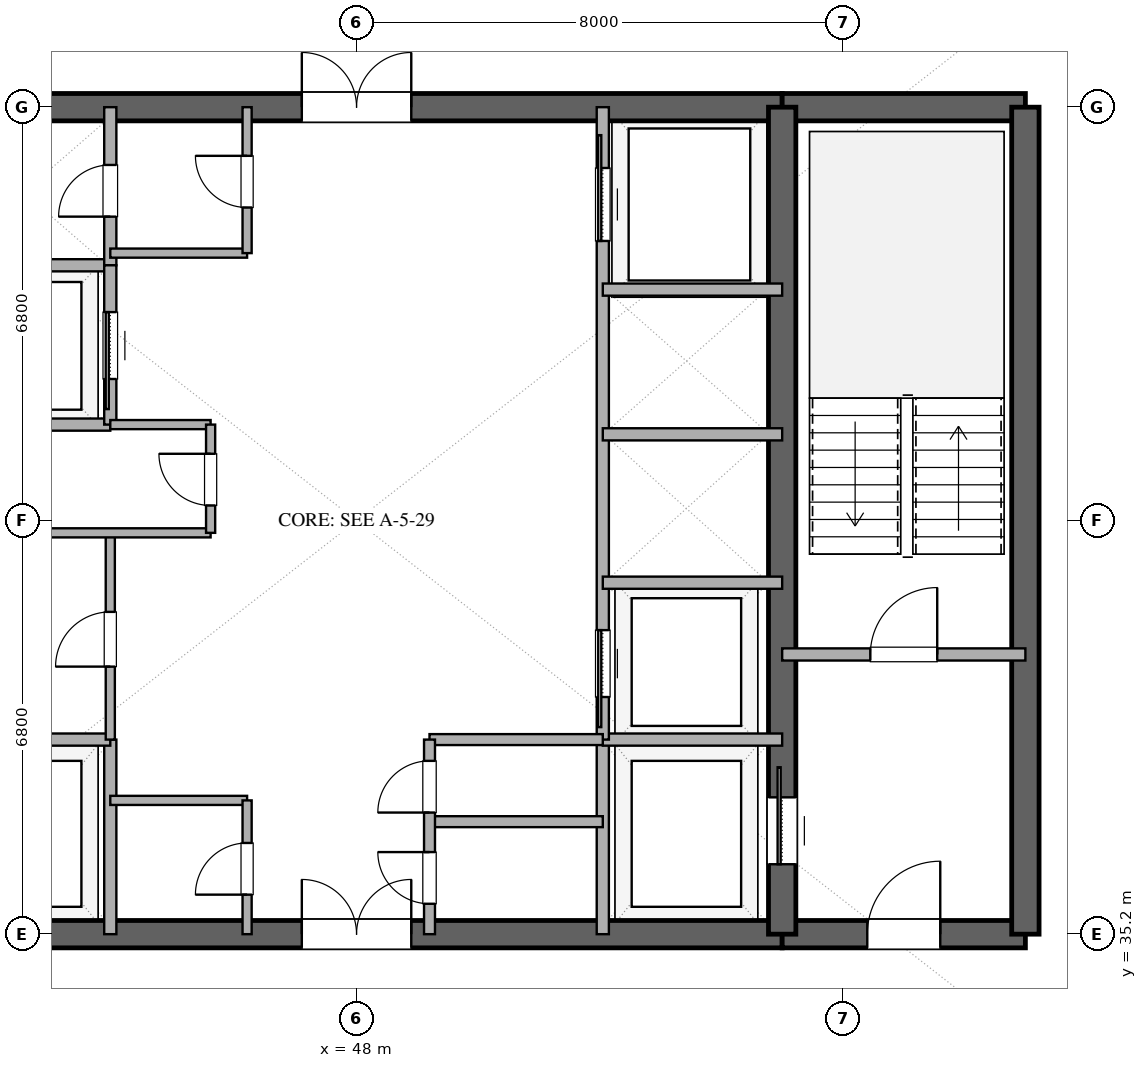
"""IFC4 building model, lengths in metres.
Left out: names, types, materials, properties, quantities, classifications, styles, units other than length and angle.
Written with IfcOpenShell. Run it as: python <this file> out.ifc"""

import sys

from ifc_helpers import new_model, si_unit, direction, frame, frame_2d, origin, place, context, subcontext, project, spatial, rectangle, extrude, element, fill, save


model = new_model("IFC4")
c1 = context("Model", 3, precision=1e-05, world=origin(), true_north=direction((0.0, 1.0)))
c2 = subcontext(c1, "Body", "Model", "MODEL_VIEW")
j1 = project(units=[si_unit("LENGTHUNIT", "METRE"), si_unit("PLANEANGLEUNIT", "RADIAN")], contexts=[c1])
p1 = place(None, origin())
s1 = spatial("IfcSite", under=j1, at=p1, CompositionType="ELEMENT")
p2 = place(p1, origin())
s2 = spatial("IfcBuilding", under=s1, at=p2, CompositionType="ELEMENT")
p3 = place(p2, frame((0.0, 0.0, 197.4)))
s3 = spatial("IfcBuildingStorey", under=s2, at=p3, CompositionType="ELEMENT", Elevation=197.4)
p4 = place(p3, frame((41.0, 35.2, 0.0), z_axis=(0.0, 0.0, 1.0), x_axis=(1.0, 0.0, 0.0)))
e1 = element("IfcWall", 1, at=p4, inside=s3, PredefinedType="SHEAR", context=c2, shape_type="SweptSolid", body=[
    extrude(rectangle(XDim=14.0, YDim=0.45, at=frame_2d((7.0, 0.0))), origin(), (0.0, 0.0, 1.0), 3.25),
])
p5 = place(p4, frame((6.1, 0.0, 0.0)))
e2 = element("IfcOpeningElement", 2, at=p5, cuts=e1, PredefinedType="OPENING", context=c2, shape_type="SweptSolid", body=[
    extrude(rectangle(XDim=1.8, YDim=2.25, at=frame_2d((0.9, 1.125))), frame((0.0, 0.235, 0.0), z_axis=(0.0, -1.0, 0.0), x_axis=(1.0, 0.0, 0.0)), (0.0, 0.0, 1.0), 0.47),
])
p6 = place(p3, frame((55.0, 35.2, 0.0), z_axis=(0.0, 0.0, 1.0), x_axis=(1.0, 0.0, 0.0)))
e3 = element("IfcWall", 3, at=p6, inside=s3, PredefinedType="SHEAR", context=c2, shape_type="SweptSolid", body=[
    extrude(rectangle(XDim=4.0, YDim=0.45, at=frame_2d((2.0, 0.0))), origin(), (0.0, 0.0, 1.0), 3.25),
])
p7 = place(p6, frame((1.4, 0.0, 0.0)))
e4 = element("IfcOpeningElement", 4, at=p7, cuts=e3, PredefinedType="OPENING", context=c2, shape_type="SweptSolid", body=[
    extrude(rectangle(XDim=1.2, YDim=2.15, at=frame_2d((0.6, 1.075))), frame((0.0, 0.235, 0.0), z_axis=(0.0, -1.0, 0.0), x_axis=(1.0, 0.0, 0.0)), (0.0, 0.0, 1.0), 0.47),
])
p8 = place(p3, frame((41.0, 48.8, 0.0), z_axis=(0.0, 0.0, 1.0), x_axis=(1.0, 0.0, 0.0)))
e5 = element("IfcWall", 5, at=p8, inside=s3, PredefinedType="SHEAR", context=c2, shape_type="SweptSolid", body=[
    extrude(rectangle(XDim=14.0, YDim=0.45, at=frame_2d((7.0, 0.0))), origin(), (0.0, 0.0, 1.0), 3.25),
])
p9 = place(p8, frame((6.1, 0.0, 0.0)))
e6 = element("IfcOpeningElement", 6, at=p9, cuts=e5, PredefinedType="OPENING", context=c2, shape_type="SweptSolid", body=[
    extrude(rectangle(XDim=1.8, YDim=2.25, at=frame_2d((0.9, 1.125))), frame((0.0, 0.235, 0.0), z_axis=(0.0, -1.0, 0.0), x_axis=(1.0, 0.0, 0.0)), (0.0, 0.0, 1.0), 0.47),
])
p10 = place(p3, frame((55.0, 48.8, 0.0), z_axis=(0.0, 0.0, 1.0), x_axis=(1.0, 0.0, 0.0)))
e7 = element("IfcWall", 7, at=p10, inside=s3, PredefinedType="SHEAR", context=c2, shape_type="SweptSolid", body=[
    extrude(rectangle(XDim=4.0, YDim=0.45, at=frame_2d((2.0, 0.0))), origin(), (0.0, 0.0, 1.0), 3.25),
])
p11 = place(p3, frame((59.0, 35.2, 0.0), z_axis=(0.0, 0.0, 1.0), x_axis=(0.0, 1.0, 0.0)))
e8 = element("IfcWall", 8, at=p11, inside=s3, PredefinedType="SHEAR", context=c2, shape_type="SweptSolid", body=[
    extrude(rectangle(XDim=13.6, YDim=0.45, at=frame_2d((6.8, 0.0))), origin(), (0.0, 0.0, 1.0), 3.25),
])
p12 = place(p3, frame((55.0, 35.2, 0.0), z_axis=(0.0, 0.0, 1.0), x_axis=(0.0, 1.0, 0.0)))
e9 = element("IfcWall", 9, at=p12, inside=s3, PredefinedType="SHEAR", context=c2, shape_type="SweptSolid", body=[
    extrude(rectangle(XDim=13.6, YDim=0.45, at=frame_2d((6.8, 0.0))), origin(), (0.0, 0.0, 1.0), 3.25),
])
p13 = place(p12, frame((1.15, 0.0, 0.0)))
e10 = element("IfcOpeningElement", 10, at=p13, cuts=e9, PredefinedType="OPENING", context=c2, shape_type="SweptSolid", body=[
    extrude(rectangle(XDim=1.1, YDim=2.2, at=frame_2d((0.55, 1.1))), frame((0.0, 0.235, 0.0), z_axis=(0.0, -1.0, 0.0), x_axis=(1.0, 0.0, 0.0)), (0.0, 0.0, 1.0), 0.47),
])
p14 = place(p3, frame((55.0, 39.8, 0.0), z_axis=(0.0, 0.0, 1.0), x_axis=(1.0, 0.0, 0.0)))
e11 = element("IfcWall", 11, at=p14, inside=s3, PredefinedType="SOLIDWALL", context=c2, shape_type="SweptSolid", body=[
    extrude(rectangle(XDim=4.0, YDim=0.2, at=frame_2d((2.0, 0.0))), origin(), (0.0, 0.0, 1.0), 2.61),
])
p15 = place(p14, frame((1.45, 0.0, 0.0)))
e12 = element("IfcOpeningElement", 12, at=p15, cuts=e11, PredefinedType="OPENING", context=c2, shape_type="SweptSolid", body=[
    extrude(rectangle(XDim=1.1, YDim=2.15, at=frame_2d((0.55, 1.075))), frame((0.0, 0.11, 0.0), z_axis=(0.0, -1.0, 0.0), x_axis=(1.0, 0.0, 0.0)), (0.0, 0.0, 1.0), 0.22),
])
p16 = place(p3, frame((43.95, 35.2, 0.0), z_axis=(0.0, 0.0, 1.0), x_axis=(0.0, 1.0, 0.0)))
e13 = element("IfcWall", 13, at=p16, inside=s3, PredefinedType="SOLIDWALL", context=c2, shape_type="SweptSolid", body=[
    extrude(rectangle(XDim=3.2, YDim=0.2, at=frame_2d((1.6, 0.0))), origin(), (0.0, 0.0, 1.0), 2.61),
])
p17 = place(p3, frame((41.0, 38.4, 0.0), z_axis=(0.0, 0.0, 1.0), x_axis=(1.0, 0.0, 0.0)))
e14 = element("IfcWall", 14, at=p17, inside=s3, PredefinedType="SOLIDWALL", context=c2, shape_type="SweptSolid", body=[
    extrude(rectangle(XDim=2.95, YDim=0.2, at=frame_2d((1.475, 0.0))), origin(), (0.0, 0.0, 1.0), 2.61),
])
p18 = place(p3, frame((52.05, 35.2, 0.0), z_axis=(0.0, 0.0, 1.0), x_axis=(0.0, 1.0, 0.0)))
e15 = element("IfcWall", 15, at=p18, inside=s3, PredefinedType="SOLIDWALL", context=c2, shape_type="SweptSolid", body=[
    extrude(rectangle(XDim=3.2, YDim=0.2, at=frame_2d((1.6, 0.0))), origin(), (0.0, 0.0, 1.0), 2.61),
])
for number, where, z_axis, x_axis in (
    (16, (52.05, 38.4, 0.0), (0.0, 0.0, 1.0), (1.0, 0.0, 0.0)),
    (17, (41.0, 46.2, 0.0), (0.0, 0.0, 1.0), (1.0, 0.0, 0.0)),
):
    element("IfcWall", number, at=place(p3, frame(where, z_axis=z_axis, x_axis=x_axis)), inside=s3, PredefinedType="SOLIDWALL", context=c2, shape_type="SweptSolid", body=[
        extrude(rectangle(XDim=2.95, YDim=0.2, at=frame_2d((1.475, 0.0))), origin(), (0.0, 0.0, 1.0), 2.61),
    ])
p19 = place(p3, frame((43.95, 46.2, 0.0), z_axis=(0.0, 0.0, 1.0), x_axis=(0.0, 1.0, 0.0)))
e18 = element("IfcWall", 18, at=p19, inside=s3, PredefinedType="SOLIDWALL", context=c2, shape_type="SweptSolid", body=[
    extrude(rectangle(XDim=2.6, YDim=0.2, at=frame_2d((1.3, 0.0))), origin(), (0.0, 0.0, 1.0), 2.61),
])
p20 = place(p19, frame((0.8, 0.0, 0.0)))
e19 = element("IfcOpeningElement", 19, at=p20, cuts=e18, PredefinedType="OPENING", context=c2, shape_type="SweptSolid", body=[
    extrude(rectangle(XDim=0.85, YDim=2.15, at=frame_2d((0.425, 1.075))), frame((0.0, 0.11, 0.0), z_axis=(0.0, -1.0, 0.0), x_axis=(1.0, 0.0, 0.0)), (0.0, 0.0, 1.0), 0.22),
])
p21 = place(p3, frame((41.0, 43.58, 0.0), z_axis=(0.0, 0.0, 1.0), x_axis=(1.0, 0.0, 0.0)))
e20 = element("IfcWall", 20, at=p21, inside=s3, PredefinedType="SOLIDWALL", context=c2, shape_type="SweptSolid", body=[
    extrude(rectangle(XDim=2.95, YDim=0.2, at=frame_2d((1.475, 0.0))), origin(), (0.0, 0.0, 1.0), 2.61),
])
p22 = place(p3, frame((43.95, 43.58, 0.0), z_axis=(0.0, 0.0, 1.0), x_axis=(0.0, 1.0, 0.0)))
e21 = element("IfcWall", 21, at=p22, inside=s3, PredefinedType="SOLIDWALL", context=c2, shape_type="SweptSolid", body=[
    extrude(rectangle(XDim=2.62, YDim=0.2, at=frame_2d((1.31, 0.0))), origin(), (0.0, 0.0, 1.0), 2.61),
])
p23 = place(p22, frame((0.75, 0.0, 0.0)))
e22 = element("IfcOpeningElement", 22, at=p23, cuts=e21, PredefinedType="OPENING", context=c2, shape_type="SweptSolid", body=[
    extrude(rectangle(XDim=1.1, YDim=2.2, at=frame_2d((0.55, 1.1))), frame((0.0, 0.11, 0.0), z_axis=(0.0, -1.0, 0.0), x_axis=(1.0, 0.0, 0.0)), (0.0, 0.0, 1.0), 0.22),
])
p24 = place(p3, frame((43.95, 38.4, 0.0), z_axis=(0.0, 0.0, 1.0), x_axis=(0.0, 1.0, 0.0)))
e23 = element("IfcWall", 23, at=p24, inside=s3, PredefinedType="PARTITIONING", context=c2, shape_type="SweptSolid", body=[
    extrude(rectangle(XDim=3.4, YDim=0.15, at=frame_2d((1.7, 0.0))), origin(), (0.0, 0.0, 1.0), 2.61),
])
p25 = place(p24, frame((1.2, 0.0, 0.0)))
e24 = element("IfcOpeningElement", 24, at=p25, cuts=e23, PredefinedType="OPENING", context=c2, shape_type="SweptSolid", body=[
    extrude(rectangle(XDim=0.9, YDim=2.15, at=frame_2d((0.45, 1.075))), frame((0.0, 0.085, 0.0), z_axis=(0.0, -1.0, 0.0), x_axis=(1.0, 0.0, 0.0)), (0.0, 0.0, 1.0), 0.17),
])
p26 = place(p3, frame((41.0, 41.8, 0.0), z_axis=(0.0, 0.0, 1.0), x_axis=(1.0, 0.0, 0.0)))
e25 = element("IfcWall", 25, at=p26, inside=s3, PredefinedType="PARTITIONING", context=c2, shape_type="SweptSolid", body=[
    extrude(rectangle(XDim=4.6, YDim=0.15, at=frame_2d((2.3, 0.0))), origin(), (0.0, 0.0, 1.0), 2.61),
])
p27 = place(p3, frame((43.95, 43.58, 0.0), z_axis=(0.0, 0.0, 1.0), x_axis=(1.0, 0.0, 0.0)))
e26 = element("IfcWall", 26, at=p27, inside=s3, PredefinedType="PARTITIONING", context=c2, shape_type="SweptSolid", body=[
    extrude(rectangle(XDim=1.65, YDim=0.15, at=frame_2d((0.825, 0.0))), origin(), (0.0, 0.0, 1.0), 2.61),
])
p28 = place(p3, frame((45.6, 41.8, 0.0), z_axis=(0.0, 0.0, 1.0), x_axis=(0.0, 1.0, 0.0)))
e27 = element("IfcWall", 27, at=p28, inside=s3, PredefinedType="PARTITIONING", context=c2, shape_type="SweptSolid", body=[
    extrude(rectangle(XDim=1.78, YDim=0.15, at=frame_2d((0.89, 0.0))), origin(), (0.0, 0.0, 1.0), 2.61),
])
p29 = place(p28, frame((0.45, 0.0, 0.0)))
e28 = element("IfcOpeningElement", 28, at=p29, cuts=e27, PredefinedType="OPENING", context=c2, shape_type="SweptSolid", body=[
    extrude(rectangle(XDim=0.85, YDim=2.15, at=frame_2d((0.425, 1.075))), frame((0.0, 0.085, 0.0), z_axis=(0.0, -1.0, 0.0), x_axis=(1.0, 0.0, 0.0)), (0.0, 0.0, 1.0), 0.17),
])
p30 = place(p3, frame((52.05, 38.4, 0.0), z_axis=(0.0, 0.0, 1.0), x_axis=(0.0, 1.0, 0.0)))
e29 = element("IfcWall", 29, at=p30, inside=s3, PredefinedType="SOLIDWALL", context=c2, shape_type="SweptSolid", body=[
    extrude(rectangle(XDim=10.4, YDim=0.2, at=frame_2d((5.2, 0.0))), origin(), (0.0, 0.0, 1.0), 2.61),
])
p31 = place(p30, frame((0.7, 0.0, 0.0)))
e30 = element("IfcOpeningElement", 30, at=p31, cuts=e29, PredefinedType="OPENING", context=c2, shape_type="SweptSolid", body=[
    extrude(rectangle(XDim=1.1, YDim=2.2, at=frame_2d((0.55, 1.1))), frame((0.0, 0.11, 0.0), z_axis=(0.0, -1.0, 0.0), x_axis=(1.0, 0.0, 0.0)), (0.0, 0.0, 1.0), 0.22),
])
p32 = place(p30, frame((8.2, 0.0, 0.0)))
e31 = element("IfcOpeningElement", 31, at=p32, cuts=e29, PredefinedType="OPENING", context=c2, shape_type="SweptSolid", body=[
    extrude(rectangle(XDim=1.2, YDim=2.2, at=frame_2d((0.6, 1.1))), frame((0.0, 0.11, 0.0), z_axis=(0.0, -1.0, 0.0), x_axis=(1.0, 0.0, 0.0)), (0.0, 0.0, 1.0), 0.22),
])
for number, where, z_axis, x_axis in (
    (32, (52.05, 40.98, 0.0), (0.0, 0.0, 1.0), (1.0, 0.0, 0.0)),
    (33, (52.05, 43.42, 0.0), (0.0, 0.0, 1.0), (1.0, 0.0, 0.0)),
    (34, (52.05, 45.8, 0.0), (0.0, 0.0, 1.0), (1.0, 0.0, 0.0)),
):
    element("IfcWall", number, at=place(p3, frame(where, z_axis=z_axis, x_axis=x_axis)), inside=s3, PredefinedType="SOLIDWALL", context=c2, shape_type="SweptSolid", body=[
        extrude(rectangle(XDim=2.95, YDim=0.2, at=frame_2d((1.475, 0.0))), origin(), (0.0, 0.0, 1.0), 2.61),
    ])
p33 = place(p3, frame((43.95, 37.4, 0.0), z_axis=(0.0, 0.0, 1.0), x_axis=(1.0, 0.0, 0.0)))
e35 = element("IfcWall", 35, at=p33, inside=s3, PredefinedType="PARTITIONING", context=c2, shape_type="SweptSolid", body=[
    extrude(rectangle(XDim=2.25, YDim=0.15, at=frame_2d((1.125, 0.0))), origin(), (0.0, 0.0, 1.0), 2.61),
])
p34 = place(p3, frame((46.2, 35.2, 0.0), z_axis=(0.0, 0.0, 1.0), x_axis=(0.0, 1.0, 0.0)))
e36 = element("IfcWall", 36, at=p34, inside=s3, PredefinedType="PARTITIONING", context=c2, shape_type="SweptSolid", body=[
    extrude(rectangle(XDim=2.2, YDim=0.15, at=frame_2d((1.1, 0.0))), origin(), (0.0, 0.0, 1.0), 2.61),
])
p35 = place(p34, frame((0.65, 0.0, 0.0)))
e37 = element("IfcOpeningElement", 37, at=p35, cuts=e36, PredefinedType="OPENING", context=c2, shape_type="SweptSolid", body=[
    extrude(rectangle(XDim=0.85, YDim=2.15, at=frame_2d((0.425, 1.075))), frame((0.0, 0.085, 0.0), z_axis=(0.0, -1.0, 0.0), x_axis=(1.0, 0.0, 0.0)), (0.0, 0.0, 1.0), 0.17),
])
p36 = place(p3, frame((43.95, 46.4, 0.0), z_axis=(0.0, 0.0, 1.0), x_axis=(1.0, 0.0, 0.0)))
e38 = element("IfcWall", 38, at=p36, inside=s3, PredefinedType="PARTITIONING", context=c2, shape_type="SweptSolid", body=[
    extrude(rectangle(XDim=2.25, YDim=0.15, at=frame_2d((1.125, 0.0))), origin(), (0.0, 0.0, 1.0), 2.61),
])
p37 = place(p3, frame((46.2, 46.4, 0.0), z_axis=(0.0, 0.0, 1.0), x_axis=(0.0, 1.0, 0.0)))
e39 = element("IfcWall", 39, at=p37, inside=s3, PredefinedType="PARTITIONING", context=c2, shape_type="SweptSolid", body=[
    extrude(rectangle(XDim=2.4, YDim=0.15, at=frame_2d((1.2, 0.0))), origin(), (0.0, 0.0, 1.0), 2.61),
])
p38 = place(p37, frame((0.75, 0.0, 0.0)))
e40 = element("IfcOpeningElement", 40, at=p38, cuts=e39, PredefinedType="OPENING", context=c2, shape_type="SweptSolid", body=[
    extrude(rectangle(XDim=0.85, YDim=2.15, at=frame_2d((0.425, 1.075))), frame((0.0, 0.085, 0.0), z_axis=(0.0, -1.0, 0.0), x_axis=(1.0, 0.0, 0.0)), (0.0, 0.0, 1.0), 0.17),
])
for number, where, z_axis, x_axis in (
    (41, (49.2, 37.05, 0.0), (0.0, 0.0, 1.0), (1.0, 0.0, 0.0)),
    (42, (49.2, 38.4, 0.0), (0.0, 0.0, 1.0), (1.0, 0.0, 0.0)),
):
    element("IfcWall", number, at=place(p3, frame(where, z_axis=z_axis, x_axis=x_axis)), inside=s3, PredefinedType="PLUMBINGWALL", context=c2, shape_type="SweptSolid", body=[
        extrude(rectangle(XDim=2.85, YDim=0.18, at=frame_2d((1.425, 0.0))), origin(), (0.0, 0.0, 1.0), 2.61),
    ])
p39 = place(p3, frame((49.2, 35.2, 0.0), z_axis=(0.0, 0.0, 1.0), x_axis=(0.0, 1.0, 0.0)))
e43 = element("IfcWall", 43, at=p39, inside=s3, PredefinedType="PLUMBINGWALL", context=c2, shape_type="SweptSolid", body=[
    extrude(rectangle(XDim=3.2, YDim=0.18, at=frame_2d((1.6, 0.0))), origin(), (0.0, 0.0, 1.0), 2.61),
])
p40 = place(p39, frame((0.5, 0.0, 0.0)))
e44 = element("IfcOpeningElement", 44, at=p40, cuts=e43, PredefinedType="OPENING", context=c2, shape_type="SweptSolid", body=[
    extrude(rectangle(XDim=0.85, YDim=2.1, at=frame_2d((0.425, 1.05))), frame((0.0, 0.1, 0.0), z_axis=(0.0, -1.0, 0.0), x_axis=(1.0, 0.0, 0.0)), (0.0, 0.0, 1.0), 0.2),
])
p41 = place(p39, frame((2.0, 0.0, 0.0)))
e45 = element("IfcOpeningElement", 45, at=p41, cuts=e43, PredefinedType="OPENING", context=c2, shape_type="SweptSolid", body=[
    extrude(rectangle(XDim=0.85, YDim=2.15, at=frame_2d((0.425, 1.075))), frame((0.0, 0.1, 0.0), z_axis=(0.0, -1.0, 0.0), x_axis=(1.0, 0.0, 0.0)), (0.0, 0.0, 1.0), 0.2),
])
p42 = place(p13, origin())
e46 = element("IfcDoor", 46, at=p42, inside=s3, OperationType="SLIDING_TO_RIGHT", PredefinedType="DOOR", context=c2, shape_type="SweptSolid", body=[
    extrude(rectangle(XDim=1.1, YDim=2.2, at=frame_2d((0.55, 1.1))), frame((0.0, 0.025, 0.0), z_axis=(0.0, -1.0, 0.0), x_axis=(1.0, 0.0, 0.0)), (0.0, 0.0, 1.0), 0.05),
])
fill(e10, e46)
p43 = place(p7, origin())
e47 = element("IfcDoor", 47, at=p43, inside=s3, OperationType="SINGLE_SWING_RIGHT", PredefinedType="DOOR", context=c2, shape_type="SweptSolid", body=[
    extrude(rectangle(XDim=1.2, YDim=2.15, at=frame_2d((0.6, 1.075))), frame((0.0, 0.025, 0.0), z_axis=(0.0, -1.0, 0.0), x_axis=(1.0, 0.0, 0.0)), (0.0, 0.0, 1.0), 0.05),
])
fill(e4, e47)
p44 = place(p5, origin())
e48 = element("IfcDoor", 48, at=p44, inside=s3, OperationType="DOUBLE_DOOR_SINGLE_SWING", PredefinedType="DOOR", context=c2, shape_type="SweptSolid", body=[
    extrude(rectangle(XDim=1.8, YDim=2.25, at=frame_2d((0.9, 1.125))), frame((0.0, 0.025, 0.0), z_axis=(0.0, -1.0, 0.0), x_axis=(1.0, 0.0, 0.0)), (0.0, 0.0, 1.0), 0.05),
])
fill(e2, e48)
p45 = place(p9, origin())
e49 = element("IfcDoor", 49, at=p45, inside=s3, OperationType="DOUBLE_DOOR_SINGLE_SWING", PredefinedType="DOOR", context=c2, shape_type="SweptSolid", body=[
    extrude(rectangle(XDim=1.8, YDim=2.25, at=frame_2d((0.9, 1.125))), frame((0.0, 0.025, 0.0), z_axis=(0.0, -1.0, 0.0), x_axis=(1.0, 0.0, 0.0)), (0.0, 0.0, 1.0), 0.05),
])
fill(e6, e49)
p46 = place(p15, origin())
e50 = element("IfcDoor", 50, at=p46, inside=s3, OperationType="SINGLE_SWING_RIGHT", PredefinedType="DOOR", context=c2, shape_type="SweptSolid", body=[
    extrude(rectangle(XDim=1.1, YDim=2.15, at=frame_2d((0.55, 1.075))), frame((0.0, 0.025, 0.0), z_axis=(0.0, -1.0, 0.0), x_axis=(1.0, 0.0, 0.0)), (0.0, 0.0, 1.0), 0.05),
])
fill(e12, e50)
p47 = place(p20, origin())
e51 = element("IfcDoor", 51, at=p47, inside=s3, OperationType="SINGLE_SWING_LEFT", PredefinedType="DOOR", context=c2, shape_type="SweptSolid", body=[
    extrude(rectangle(XDim=0.85, YDim=2.15, at=frame_2d((0.425, 1.075))), frame((0.0, 0.025, 0.0), z_axis=(0.0, -1.0, 0.0), x_axis=(1.0, 0.0, 0.0)), (0.0, 0.0, 1.0), 0.05),
])
fill(e19, e51)
p48 = place(p23, origin())
e52 = element("IfcDoor", 52, at=p48, inside=s3, OperationType="SLIDING_TO_LEFT", PredefinedType="DOOR", context=c2, shape_type="SweptSolid", body=[
    extrude(rectangle(XDim=1.1, YDim=2.2, at=frame_2d((0.55, 1.1))), frame((0.0, 0.025, 0.0), z_axis=(0.0, -1.0, 0.0), x_axis=(1.0, 0.0, 0.0)), (0.0, 0.0, 1.0), 0.05),
])
fill(e22, e52)
p49 = place(p25, origin())
e53 = element("IfcDoor", 53, at=p49, inside=s3, OperationType="SINGLE_SWING_LEFT", PredefinedType="DOOR", context=c2, shape_type="SweptSolid", body=[
    extrude(rectangle(XDim=0.9, YDim=2.15, at=frame_2d((0.45, 1.075))), frame((0.0, 0.025, 0.0), z_axis=(0.0, -1.0, 0.0), x_axis=(1.0, 0.0, 0.0)), (0.0, 0.0, 1.0), 0.05),
])
fill(e24, e53)
p50 = place(p29, origin())
e54 = element("IfcDoor", 54, at=p50, inside=s3, OperationType="SINGLE_SWING_RIGHT", PredefinedType="DOOR", context=c2, shape_type="SweptSolid", body=[
    extrude(rectangle(XDim=0.85, YDim=2.15, at=frame_2d((0.425, 1.075))), frame((0.0, 0.025, 0.0), z_axis=(0.0, -1.0, 0.0), x_axis=(1.0, 0.0, 0.0)), (0.0, 0.0, 1.0), 0.05),
])
fill(e28, e54)
p51 = place(p31, origin())
e55 = element("IfcDoor", 55, at=p51, inside=s3, OperationType="SLIDING_TO_LEFT", PredefinedType="DOOR", context=c2, shape_type="SweptSolid", body=[
    extrude(rectangle(XDim=1.1, YDim=2.2, at=frame_2d((0.55, 1.1))), frame((0.0, 0.025, 0.0), z_axis=(0.0, -1.0, 0.0), x_axis=(1.0, 0.0, 0.0)), (0.0, 0.0, 1.0), 0.05),
])
fill(e30, e55)
p52 = place(p32, origin())
e56 = element("IfcDoor", 56, at=p52, inside=s3, OperationType="SLIDING_TO_RIGHT", PredefinedType="DOOR", context=c2, shape_type="SweptSolid", body=[
    extrude(rectangle(XDim=1.2, YDim=2.2, at=frame_2d((0.6, 1.1))), frame((0.0, 0.025, 0.0), z_axis=(0.0, -1.0, 0.0), x_axis=(1.0, 0.0, 0.0)), (0.0, 0.0, 1.0), 0.05),
])
fill(e31, e56)
p53 = place(p35, origin())
e57 = element("IfcDoor", 57, at=p53, inside=s3, OperationType="SINGLE_SWING_LEFT", PredefinedType="DOOR", context=c2, shape_type="SweptSolid", body=[
    extrude(rectangle(XDim=0.85, YDim=2.15, at=frame_2d((0.425, 1.075))), frame((0.0, 0.025, 0.0), z_axis=(0.0, -1.0, 0.0), x_axis=(1.0, 0.0, 0.0)), (0.0, 0.0, 1.0), 0.05),
])
fill(e37, e57)
p54 = place(p38, origin())
e58 = element("IfcDoor", 58, at=p54, inside=s3, OperationType="SINGLE_SWING_RIGHT", PredefinedType="DOOR", context=c2, shape_type="SweptSolid", body=[
    extrude(rectangle(XDim=0.85, YDim=2.15, at=frame_2d((0.425, 1.075))), frame((0.0, 0.025, 0.0), z_axis=(0.0, -1.0, 0.0), x_axis=(1.0, 0.0, 0.0)), (0.0, 0.0, 1.0), 0.05),
])
fill(e40, e58)
p55 = place(p40, origin())
e59 = element("IfcDoor", 59, at=p55, inside=s3, OperationType="SINGLE_SWING_RIGHT", PredefinedType="DOOR", context=c2, shape_type="SweptSolid", body=[
    extrude(rectangle(XDim=0.85, YDim=2.1, at=frame_2d((0.425, 1.05))), frame((0.0, 0.025, 0.0), z_axis=(0.0, -1.0, 0.0), x_axis=(1.0, 0.0, 0.0)), (0.0, 0.0, 1.0), 0.05),
])
fill(e44, e59)
p56 = place(p41, origin())
e60 = element("IfcDoor", 60, at=p56, inside=s3, OperationType="SINGLE_SWING_LEFT", PredefinedType="DOOR", context=c2, shape_type="SweptSolid", body=[
    extrude(rectangle(XDim=0.85, YDim=2.15, at=frame_2d((0.425, 1.075))), frame((0.0, 0.025, 0.0), z_axis=(0.0, -1.0, 0.0), x_axis=(1.0, 0.0, 0.0)), (0.0, 0.0, 1.0), 0.05),
])
fill(e45, e60)
save(model, sys.argv[1])
